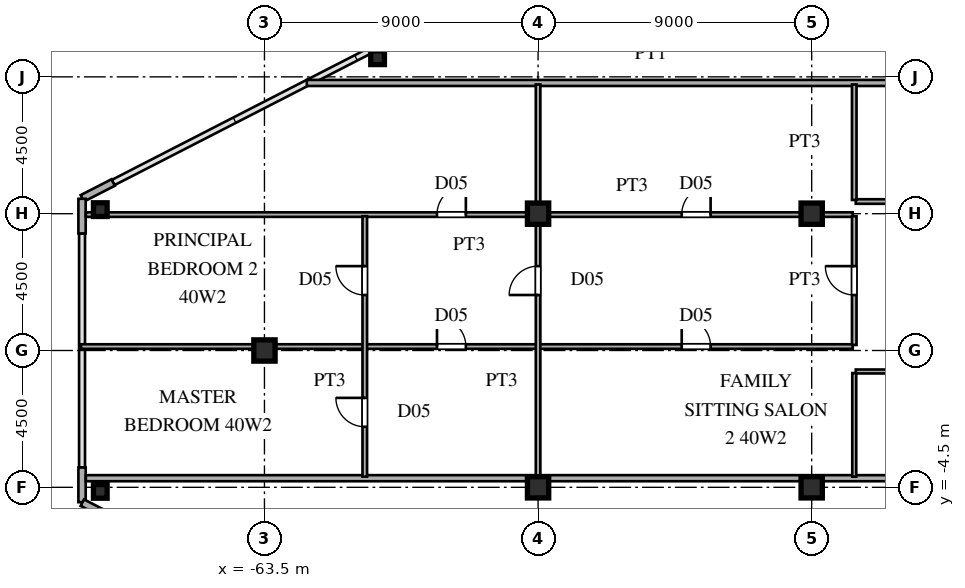
"""IFC4 building model, lengths in metres.
Left out: names, types, materials, properties, quantities, classifications, styles, units other than length and angle.
Written with IfcOpenShell. Run it as: python <this file> out.ifc"""

import sys

from ifc_helpers import new_model, si_unit, direction, frame, frame_2d, origin, origin_2d, place, context, subcontext, project, spatial, rectangle, hollow_rectangle, i_section, extrude, source, transform, mapped, element, fill, save


model = new_model("IFC4")
c1 = context("Model", 3, precision=1e-05, world=origin(), true_north=direction((0.0, 1.0)))
c2 = subcontext(c1, "Body", "Model", "MODEL_VIEW")
j1 = project(units=[si_unit("LENGTHUNIT", "METRE"), si_unit("PLANEANGLEUNIT", "RADIAN")], contexts=[c1])
p1 = place(None, origin())
s1 = spatial("IfcSite", under=j1, at=p1, CompositionType="ELEMENT")
p2 = place(p1, origin())
s2 = spatial("IfcBuilding", under=s1, at=p2, CompositionType="ELEMENT")
p3 = place(p2, frame((0.0, 0.0, 151.2)))
s3 = spatial("IfcBuildingStorey", under=s2, at=p3, CompositionType="ELEMENT", Elevation=151.2)
m1 = source(origin(), c2, "Body", "SweptSolid", [
    extrude(i_section(OverallWidth=0.7, OverallDepth=0.7, WebThickness=0.028, FlangeThickness=0.045, at=origin_2d()), origin(), (0.0, 0.0, 1.0), 3.6),
])
for number, where, z_axis, x_axis in (
    (1, (-45.5, -4.5, 0.0), (0.0, 0.0, 1.0), (1.0, 0.0, 0.0)),
    (2, (-45.5, 4.5, 0.0), (0.0, 0.0, 1.0), (1.0, 0.0, 0.0)),
    (3, (-54.5, -4.5, 0.0), (0.0, 0.0, 1.0), (1.0, 0.0, 0.0)),
    (4, (-54.5, 4.5, 0.0), (0.0, 0.0, 1.0), (1.0, 0.0, 0.0)),
    (5, (-63.5, 0.0, 0.0), (0.0, 0.0, 1.0), (1.0, 0.0, 0.0)),
):
    element("IfcColumn", number, at=place(p3, frame(where, z_axis=z_axis, x_axis=x_axis)), inside=s3, PredefinedType="COLUMN", context=c2, shape_type="MappedRepresentation", body=[
        mapped(m1, transform((0.0, 0.0, 0.0), scale=1.0)),
    ])
m2 = source(origin(), c2, "Body", "SweptSolid", [
    extrude(hollow_rectangle(XDim=0.45, YDim=0.45, WallThickness=0.018, at=origin_2d()), origin(), (0.0, 0.0, 1.0), 3.6),
])
for number, where, z_axis, x_axis in (
    (6, (-68.9, 4.634, 0.0), (0.0, 0.0, 1.0), (1.0, 0.0, 0.0)),
    (7, (-68.9, -4.634, 0.0), (0.0, 0.0, 1.0), (1.0, 0.0, 0.0)),
    (8, (-59.779, 9.629, 0.0), (0.0, 0.0, 1.0), (1.0, 0.0, 0.0)),
):
    element("IfcColumn", number, at=place(p3, frame(where, z_axis=z_axis, x_axis=x_axis)), inside=s3, PredefinedType="COLUMN", context=c2, shape_type="MappedRepresentation", body=[
        mapped(m2, transform((0.0, 0.0, 0.0), scale=1.0)),
    ])
p4 = place(p3, frame((-68.477, 5.525, 0.0), z_axis=(0.0, 0.0, 1.0), x_axis=(-0.889797395748, -0.456355776255, 0.0)))
e9 = element("IfcWall", 9, at=p4, inside=s3, PredefinedType="SOLIDWALL", context=c2, shape_type="SweptSolid", body=[
    extrude(rectangle(XDim=1.14, YDim=0.24, at=frame_2d((0.57, 0.0))), origin(), (0.0, 0.0, 1.0), 3.38),
])
for number, where, z_axis, x_axis in (
    (10, (-69.5, 4.99, 0.0), (0.0, 0.0, 1.0), (0.0, -1.0, 0.0)),
    (11, (-69.5, -3.85, 0.0), (0.0, 0.0, 1.0), (0.0, -1.0, 0.0)),
):
    element("IfcWall", number, at=place(p3, frame(where, z_axis=z_axis, x_axis=x_axis)), inside=s3, PredefinedType="SOLIDWALL", context=c2, shape_type="SweptSolid", body=[
        extrude(rectangle(XDim=1.14, YDim=0.24, at=frame_2d((0.57, 0.0))), origin(), (0.0, 0.0, 1.0), 3.38),
    ])
p5 = place(p3, frame((-69.491, -5.005, 0.0), z_axis=(0.0, 0.0, 1.0), x_axis=(0.889797395748, -0.456355776255, 0.0)))
e12 = element("IfcWall", 12, at=p5, inside=s3, PredefinedType="SOLIDWALL", context=c2, shape_type="SweptSolid", body=[
    extrude(rectangle(XDim=1.14, YDim=0.24, at=frame_2d((0.57, 0.0))), origin(), (0.0, 0.0, 1.0), 3.38),
])
p6 = place(p3, frame((-69.375, -4.2, 0.0), z_axis=(0.0, 0.0, 1.0), x_axis=(1.0, 0.0, 0.0)))
e13 = element("IfcWall", 13, at=p6, inside=s3, PredefinedType="PARTITIONING", context=c2, shape_type="SweptSolid", body=[
    extrude(rectangle(XDim=29.895, YDim=0.2, at=frame_2d((14.948, 0.0))), origin(), (0.0, 0.0, 1.0), 3.38),
])
p7 = place(p3, frame((-44.05, -0.69, 0.0), z_axis=(0.0, 0.0, 1.0), x_axis=(1.0, 0.0, 0.0)))
e14 = element("IfcWall", 14, at=p7, inside=s3, PredefinedType="PARTITIONING", context=c2, shape_type="SweptSolid", body=[
    extrude(rectangle(XDim=4.6, YDim=0.13, at=frame_2d((2.3, 0.0))), origin(), (0.0, 0.0, 1.0), 3.38),
])
p8 = place(p7, frame((1.86, 0.0, 0.0)))
e15 = element("IfcOpeningElement", 15, at=p8, cuts=e14, PredefinedType="OPENING", context=c2, shape_type="SweptSolid", body=[
    extrude(rectangle(XDim=0.88, YDim=2.1, at=frame_2d((0.44, 1.05))), frame((0.0, 0.075, 0.0), z_axis=(0.0, -1.0, 0.0), x_axis=(1.0, 0.0, 0.0)), (0.0, 0.0, 1.0), 0.15),
])
p9 = place(p3, frame((-69.535, 0.13, 0.0), z_axis=(0.0, 0.0, 1.0), x_axis=(1.0, 0.0, 0.0)))
e16 = element("IfcWall", 16, at=p9, inside=s3, PredefinedType="PARTITIONING", context=c2, shape_type="SweptSolid", body=[
    extrude(rectangle(XDim=25.385, YDim=0.15, at=frame_2d((12.692, 0.0))), origin(), (0.0, 0.0, 1.0), 3.38),
])
p10 = place(p9, frame((19.76, 0.0, 0.0)))
e17 = element("IfcOpeningElement", 17, at=p10, cuts=e16, PredefinedType="OPENING", context=c2, shape_type="SweptSolid", body=[
    extrude(rectangle(XDim=0.95, YDim=2.15, at=frame_2d((0.475, 1.075))), frame((0.0, 0.085, 0.0), z_axis=(0.0, -1.0, 0.0), x_axis=(1.0, 0.0, 0.0)), (0.0, 0.0, 1.0), 0.17),
])
p11 = place(p9, frame((11.71, 0.0, 0.0)))
e18 = element("IfcOpeningElement", 18, at=p11, cuts=e16, PredefinedType="OPENING", context=c2, shape_type="SweptSolid", body=[
    extrude(rectangle(XDim=0.95, YDim=2.15, at=frame_2d((0.475, 1.075))), frame((0.0, 0.085, 0.0), z_axis=(0.0, -1.0, 0.0), x_axis=(1.0, 0.0, 0.0)), (0.0, 0.0, 1.0), 0.17),
])
p12 = place(p3, frame((-69.375, 4.47, 0.0), z_axis=(0.0, 0.0, 1.0), x_axis=(1.0, 0.0, 0.0)))
e19 = element("IfcWall", 19, at=p12, inside=s3, PredefinedType="PARTITIONING", context=c2, shape_type="SweptSolid", body=[
    extrude(rectangle(XDim=25.225, YDim=0.15, at=frame_2d((12.613, 0.0))), origin(), (0.0, 0.0, 1.0), 2.78),
])
p13 = place(p12, frame((19.6, 0.0, 0.0)))
e20 = element("IfcOpeningElement", 20, at=p13, cuts=e19, PredefinedType="OPENING", context=c2, shape_type="SweptSolid", body=[
    extrude(rectangle(XDim=0.95, YDim=2.15, at=frame_2d((0.475, 1.075))), frame((0.0, 0.085, 0.0), z_axis=(0.0, -1.0, 0.0), x_axis=(1.0, 0.0, 0.0)), (0.0, 0.0, 1.0), 0.17),
])
p14 = place(p12, frame((11.55, 0.0, 0.0)))
e21 = element("IfcOpeningElement", 21, at=p14, cuts=e19, PredefinedType="OPENING", context=c2, shape_type="SweptSolid", body=[
    extrude(rectangle(XDim=0.95, YDim=2.15, at=frame_2d((0.475, 1.075))), frame((0.0, 0.085, 0.0), z_axis=(0.0, -1.0, 0.0), x_axis=(1.0, 0.0, 0.0)), (0.0, 0.0, 1.0), 0.17),
])
p15 = place(p3, frame((-44.05, 4.9, 0.0), z_axis=(0.0, 0.0, 1.0), x_axis=(1.0, 0.0, 0.0)))
e22 = element("IfcWall", 22, at=p15, inside=s3, PredefinedType="PARTITIONING", context=c2, shape_type="SweptSolid", body=[
    extrude(rectangle(XDim=4.6, YDim=0.15, at=frame_2d((2.3, 0.0))), origin(), (0.0, 0.0, 1.0), 3.38),
])
p16 = place(p15, frame((1.825, 0.0, 0.0)))
e23 = element("IfcOpeningElement", 23, at=p16, cuts=e22, PredefinedType="OPENING", context=c2, shape_type="SweptSolid", body=[
    extrude(rectangle(XDim=0.95, YDim=2.15, at=frame_2d((0.475, 1.075))), frame((0.0, 0.085, 0.0), z_axis=(0.0, -1.0, 0.0), x_axis=(1.0, 0.0, 0.0)), (0.0, 0.0, 1.0), 0.17),
])
p17 = place(p3, frame((-62.106, 8.8, 0.0), z_axis=(0.0, 0.0, 1.0), x_axis=(1.0, 0.0, 0.0)))
e24 = element("IfcWall", 24, at=p17, inside=s3, PredefinedType="PARTITIONING", context=c2, shape_type="SweptSolid", body=[
    extrude(rectangle(XDim=22.626, YDim=0.2, at=frame_2d((11.313, 0.0))), origin(), (0.0, 0.0, 1.0), 3.38),
])
p18 = place(p3, frame((-60.2, -4.15, 0.0), z_axis=(0.0, 0.0, 1.0), x_axis=(0.0, 1.0, 0.0)))
e25 = element("IfcWall", 25, at=p18, inside=s3, PredefinedType="PARTITIONING", context=c2, shape_type="SweptSolid", body=[
    extrude(rectangle(XDim=8.567, YDim=0.15, at=frame_2d((4.283, 0.0))), origin(), (0.0, 0.0, 1.0), 3.38),
])
p19 = place(p18, frame((1.642, 0.0, 0.0)))
e26 = element("IfcOpeningElement", 26, at=p19, cuts=e25, PredefinedType="OPENING", context=c2, shape_type="SweptSolid", body=[
    extrude(rectangle(XDim=0.95, YDim=2.15, at=frame_2d((0.475, 1.075))), frame((0.0, 0.085, 0.0), z_axis=(0.0, -1.0, 0.0), x_axis=(1.0, 0.0, 0.0)), (0.0, 0.0, 1.0), 0.17),
])
p20 = place(p18, frame((5.975, 0.0, 0.0)))
e27 = element("IfcOpeningElement", 27, at=p20, cuts=e25, PredefinedType="OPENING", context=c2, shape_type="SweptSolid", body=[
    extrude(rectangle(XDim=0.95, YDim=2.15, at=frame_2d((0.475, 1.075))), frame((0.0, 0.085, 0.0), z_axis=(0.0, -1.0, 0.0), x_axis=(1.0, 0.0, 0.0)), (0.0, 0.0, 1.0), 0.17),
])
p21 = place(p3, frame((-54.5, -4.15, 0.0), z_axis=(0.0, 0.0, 1.0), x_axis=(0.0, 1.0, 0.0)))
e28 = element("IfcWall", 28, at=p21, inside=s3, PredefinedType="PARTITIONING", context=c2, shape_type="SweptSolid", body=[
    extrude(rectangle(XDim=12.9, YDim=0.15, at=frame_2d((6.45, 0.0))), origin(), (0.0, 0.0, 1.0), 2.78),
])
p22 = place(p21, frame((5.975, 0.0, 0.0)))
e29 = element("IfcOpeningElement", 29, at=p22, cuts=e28, PredefinedType="OPENING", context=c2, shape_type="SweptSolid", body=[
    extrude(rectangle(XDim=0.95, YDim=2.15, at=frame_2d((0.475, 1.075))), frame((0.0, 0.085, 0.0), z_axis=(0.0, -1.0, 0.0), x_axis=(1.0, 0.0, 0.0)), (0.0, 0.0, 1.0), 0.17),
])
p23 = place(p3, frame((-44.1, -4.15, 0.0), z_axis=(0.0, 0.0, 1.0), x_axis=(0.0, 1.0, 0.0)))
e30 = element("IfcWall", 30, at=p23, inside=s3, PredefinedType="PARTITIONING", context=c2, shape_type="SweptSolid", body=[
    extrude(rectangle(XDim=3.408, YDim=0.13, at=frame_2d((1.704, 0.0))), origin(), (0.0, 0.0, 1.0), 3.38),
])
p24 = place(p3, frame((-44.1, 0.183, 0.0), z_axis=(0.0, 0.0, 1.0), x_axis=(0.0, 1.0, 0.0)))
e31 = element("IfcWall", 31, at=p24, inside=s3, PredefinedType="PARTITIONING", context=c2, shape_type="SweptSolid", body=[
    extrude(rectangle(XDim=4.234, YDim=0.15, at=frame_2d((2.117, 0.0))), origin(), (0.0, 0.0, 1.0), 3.38),
])
p25 = place(p24, frame((1.642, 0.0, 0.0)))
e32 = element("IfcOpeningElement", 32, at=p25, cuts=e31, PredefinedType="OPENING", context=c2, shape_type="SweptSolid", body=[
    extrude(rectangle(XDim=0.95, YDim=2.15, at=frame_2d((0.475, 1.075))), frame((0.0, 0.085, 0.0), z_axis=(0.0, -1.0, 0.0), x_axis=(1.0, 0.0, 0.0)), (0.0, 0.0, 1.0), 0.17),
])
p26 = place(p3, frame((-44.1, 4.952, 0.0), z_axis=(0.0, 0.0, 1.0), x_axis=(0.0, 1.0, 0.0)))
e33 = element("IfcWall", 33, at=p26, inside=s3, PredefinedType="PARTITIONING", context=c2, shape_type="SweptSolid", body=[
    extrude(rectangle(XDim=3.798, YDim=0.15, at=frame_2d((1.899, 0.0))), origin(), (0.0, 0.0, 1.0), 3.38),
])
m3 = source(origin(), c2, "Body", "SweptSolid", [
    extrude(rectangle(XDim=0.95, YDim=2.15, at=frame_2d((0.475, 1.075))), frame((0.0, 0.025, 0.0), z_axis=(0.0, -1.0, 0.0), x_axis=(1.0, 0.0, 0.0)), (0.0, 0.0, 1.0), 0.05),
])
p27 = place(p10, origin())
e34 = element("IfcDoor", 34, at=p27, inside=s3, OperationType="SINGLE_SWING_LEFT", PredefinedType="DOOR", context=c2, shape_type="MappedRepresentation", body=[
    mapped(m3, transform((0.0, 0.0, 0.0), scale=1.0)),
])
fill(e17, e34)
p28 = place(p11, origin())
e35 = element("IfcDoor", 35, at=p28, inside=s3, OperationType="SINGLE_SWING_LEFT", PredefinedType="DOOR", context=c2, shape_type="MappedRepresentation", body=[
    mapped(m3, transform((0.0, 0.0, 0.0), scale=1.0)),
])
fill(e18, e35)
p29 = place(p13, origin())
e36 = element("IfcDoor", 36, at=p29, inside=s3, OperationType="SINGLE_SWING_RIGHT", PredefinedType="DOOR", context=c2, shape_type="MappedRepresentation", body=[
    mapped(m3, transform((0.0, 0.0, 0.0), scale=1.0)),
])
fill(e20, e36)
p30 = place(p14, origin())
e37 = element("IfcDoor", 37, at=p30, inside=s3, OperationType="SINGLE_SWING_RIGHT", PredefinedType="DOOR", context=c2, shape_type="MappedRepresentation", body=[
    mapped(m3, transform((0.0, 0.0, 0.0), scale=1.0)),
])
fill(e21, e37)
p31 = place(p19, origin())
e38 = element("IfcDoor", 38, at=p31, inside=s3, OperationType="SINGLE_SWING_RIGHT", PredefinedType="DOOR", context=c2, shape_type="MappedRepresentation", body=[
    mapped(m3, transform((0.0, 0.0, 0.0), scale=1.0)),
])
fill(e26, e38)
p32 = place(p20, origin())
e39 = element("IfcDoor", 39, at=p32, inside=s3, OperationType="SINGLE_SWING_RIGHT", PredefinedType="DOOR", context=c2, shape_type="MappedRepresentation", body=[
    mapped(m3, transform((0.0, 0.0, 0.0), scale=1.0)),
])
fill(e27, e39)
p33 = place(p22, origin())
e40 = element("IfcDoor", 40, at=p33, inside=s3, OperationType="SINGLE_SWING_LEFT", PredefinedType="DOOR", context=c2, shape_type="MappedRepresentation", body=[
    mapped(m3, transform((0.0, 0.0, 0.0), scale=1.0)),
])
fill(e29, e40)
p34 = place(p25, origin())
e41 = element("IfcDoor", 41, at=p34, inside=s3, OperationType="SINGLE_SWING_RIGHT", PredefinedType="DOOR", context=c2, shape_type="MappedRepresentation", body=[
    mapped(m3, transform((0.0, 0.0, 0.0), scale=1.0)),
])
fill(e32, e41)
save(model, sys.argv[1])
